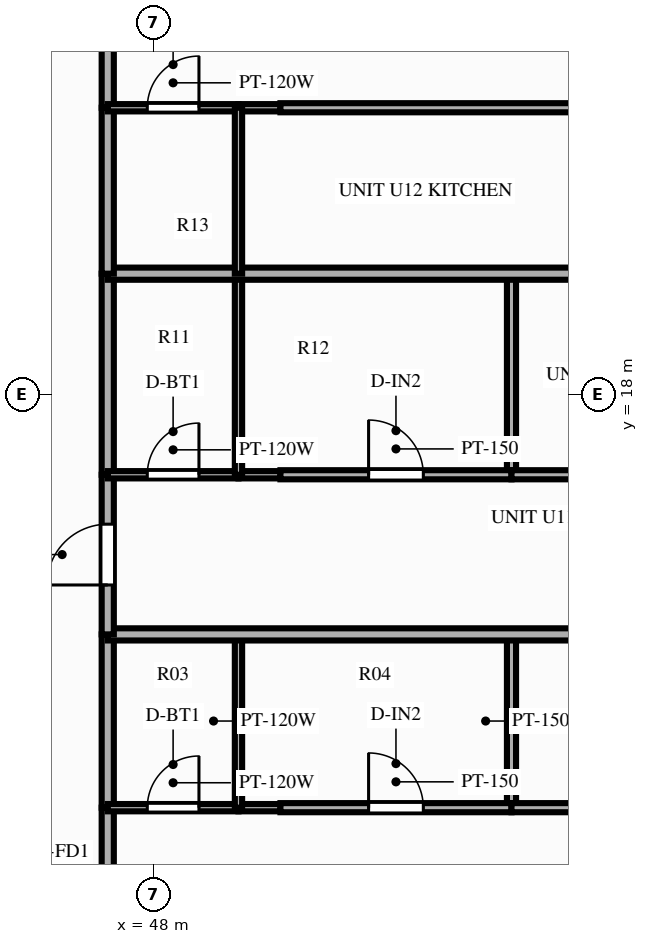
"""IFC4 building model, lengths in metres.
Left out: names, types, materials, properties, quantities, classifications, styles, units other than length and angle.
Written with IfcOpenShell. Run it as: python <this file> out.ifc"""

import sys

from ifc_helpers import new_model, si_unit, direction, frame, frame_2d, origin, place, context, subcontext, project, spatial, rectangle, extrude, source, transform, mapped, element, fill, save


model = new_model("IFC4")
c1 = context("Model", 3, precision=1e-05, world=origin(), true_north=direction((0.0, 1.0)))
c2 = subcontext(c1, "Body", "Model", "MODEL_VIEW")
j1 = project(units=[si_unit("LENGTHUNIT", "METRE"), si_unit("PLANEANGLEUNIT", "RADIAN")], contexts=[c1])
p1 = place(None, origin())
s1 = spatial("IfcSite", under=j1, at=p1, CompositionType="ELEMENT")
p2 = place(p1, origin())
s2 = spatial("IfcBuilding", under=s1, at=p2, CompositionType="ELEMENT")
p3 = place(p2, frame((0.0, 0.0, 113.85)))
s3 = spatial("IfcBuildingStorey", under=s2, at=p3, CompositionType="ELEMENT", Elevation=113.85)
p4 = place(p3, frame((47.25, 7.38, 0.0), z_axis=(0.0, 0.0, 1.0), x_axis=(0.0, 1.0, 0.0)))
e1 = element("IfcWall", 1, at=p4, inside=s3, PredefinedType="PARTITIONING", context=c2, shape_type="SweptSolid", body=[
    extrude(rectangle(XDim=3.824, YDim=0.2, at=frame_2d((1.912, 0.0))), origin(), (0.0, 0.0, 1.0), 2.79),
])
p5 = place(p4, frame((1.412, 0.0, 0.0)))
e2 = element("IfcOpeningElement", 2, at=p5, cuts=e1, PredefinedType="OPENING", context=c2, shape_type="SweptSolid", body=[
    extrude(rectangle(XDim=1.0, YDim=2.15, at=frame_2d((0.5, 1.075))), frame((0.0, 0.112, 0.0), z_axis=(0.0, -1.0, 0.0), x_axis=(1.0, 0.0, 0.0)), (0.0, 0.0, 1.0), 0.224),
])
p6 = place(p3, frame((47.25, 11.204, 0.0), z_axis=(0.0, 0.0, 1.0), x_axis=(0.0, 1.0, 0.0)))
e3 = element("IfcWall", 3, at=p6, inside=s3, PredefinedType="PARTITIONING", context=c2, shape_type="SweptSolid", body=[
    extrude(rectangle(XDim=2.85, YDim=0.2, at=frame_2d((1.425, 0.0))), origin(), (0.0, 0.0, 1.0), 2.79),
])
p7 = place(p3, frame((47.25, 11.204, 0.0), z_axis=(0.0, 0.0, 1.0), x_axis=(1.0, 0.0, 0.0)))
e4 = element("IfcWall", 4, at=p7, inside=s3, PredefinedType="PARTITIONING", context=c2, shape_type="SweptSolid", body=[
    extrude(rectangle(XDim=2.15, YDim=0.12, at=frame_2d((1.075, 0.0))), origin(), (0.0, 0.0, 1.0), 2.79),
])
p8 = place(p7, frame((0.65, 0.0, 0.0)))
e5 = element("IfcOpeningElement", 5, at=p8, cuts=e4, PredefinedType="OPENING", context=c2, shape_type="SweptSolid", body=[
    extrude(rectangle(XDim=0.85, YDim=2.05, at=frame_2d((0.425, 1.025))), frame((0.0, 0.072, 0.0), z_axis=(0.0, -1.0, 0.0), x_axis=(1.0, 0.0, 0.0)), (0.0, 0.0, 1.0), 0.144),
])
p9 = place(p3, frame((49.4, 11.204, 0.0), z_axis=(0.0, 0.0, 1.0), x_axis=(1.0, 0.0, 0.0)))
e6 = element("IfcWall", 6, at=p9, inside=s3, PredefinedType="PARTITIONING", context=c2, shape_type="SweptSolid", body=[
    extrude(rectangle(XDim=0.69, YDim=0.12, at=frame_2d((0.345, 0.0))), origin(), (0.0, 0.0, 1.0), 2.79),
])
p10 = place(p3, frame((49.4, 11.204, 0.0), z_axis=(0.0, 0.0, 1.0), x_axis=(0.0, 1.0, 0.0)))
e7 = element("IfcWall", 7, at=p10, inside=s3, PredefinedType="PARTITIONING", context=c2, shape_type="SweptSolid", body=[
    extrude(rectangle(XDim=2.85, YDim=0.12, at=frame_2d((1.425, 0.0))), origin(), (0.0, 0.0, 1.0), 2.79),
])
p11 = place(p3, frame((53.89, 11.204, 0.0), z_axis=(0.0, 0.0, 1.0), x_axis=(0.0, 1.0, 0.0)))
e8 = element("IfcWall", 8, at=p11, inside=s3, PredefinedType="PARTITIONING", context=c2, shape_type="SweptSolid", body=[
    extrude(rectangle(XDim=2.85, YDim=0.15, at=frame_2d((1.425, 0.0))), origin(), (0.0, 0.0, 1.0), 2.79),
])
p12 = place(p3, frame((50.09, 11.204, 0.0), z_axis=(0.0, 0.0, 1.0), x_axis=(1.0, 0.0, 0.0)))
e9 = element("IfcWall", 9, at=p12, inside=s3, PredefinedType="PARTITIONING", context=c2, shape_type="SweptSolid", body=[
    extrude(rectangle(XDim=3.8, YDim=0.15, at=frame_2d((1.9, 0.0))), origin(), (0.0, 0.0, 1.0), 2.79),
])
p13 = place(p12, frame((1.45, 0.0, 0.0)))
e10 = element("IfcOpeningElement", 10, at=p13, cuts=e9, PredefinedType="OPENING", context=c2, shape_type="SweptSolid", body=[
    extrude(rectangle(XDim=0.9, YDim=2.1, at=frame_2d((0.45, 1.05))), frame((0.0, 0.087, 0.0), z_axis=(0.0, -1.0, 0.0), x_axis=(1.0, 0.0, 0.0)), (0.0, 0.0, 1.0), 0.174),
])
p14 = place(p3, frame((53.89, 11.204, 0.0), z_axis=(0.0, 0.0, 1.0), x_axis=(1.0, 0.0, 0.0)))
e11 = element("IfcWall", 11, at=p14, inside=s3, PredefinedType="PARTITIONING", context=c2, shape_type="SweptSolid", body=[
    extrude(rectangle(XDim=9.96, YDim=0.15, at=frame_2d((4.98, 0.0))), origin(), (0.0, 0.0, 1.0), 2.79),
])
p15 = place(p14, frame((4.53, 0.0, 0.0)))
e12 = element("IfcOpeningElement", 12, at=p15, cuts=e11, PredefinedType="OPENING", context=c2, shape_type="SweptSolid", body=[
    extrude(rectangle(XDim=0.9, YDim=2.1, at=frame_2d((0.45, 1.05))), frame((0.0, 0.087, 0.0), z_axis=(0.0, -1.0, 0.0), x_axis=(1.0, 0.0, 0.0)), (0.0, 0.0, 1.0), 0.174),
])
p16 = place(p3, frame((47.25, 14.054, 0.0), z_axis=(0.0, 0.0, 1.0), x_axis=(1.0, 0.0, 0.0)))
e13 = element("IfcWall", 13, at=p16, inside=s3, PredefinedType="PARTITIONING", context=c2, shape_type="SweptSolid", body=[
    extrude(rectangle(XDim=16.6, YDim=0.2, at=frame_2d((8.3, 0.0))), origin(), (0.0, 0.0, 1.0), 2.79),
])
p17 = place(p3, frame((47.25, 14.054, 0.0), z_axis=(0.0, 0.0, 1.0), x_axis=(0.0, 1.0, 0.0)))
e14 = element("IfcWall", 14, at=p17, inside=s3, PredefinedType="PARTITIONING", context=c2, shape_type="SweptSolid", body=[
    extrude(rectangle(XDim=2.625, YDim=0.2, at=frame_2d((1.313, 0.0))), origin(), (0.0, 0.0, 1.0), 2.79),
])
p18 = place(p17, frame((0.813, 0.0, 0.0)))
e15 = element("IfcOpeningElement", 15, at=p18, cuts=e14, PredefinedType="OPENING", context=c2, shape_type="SweptSolid", body=[
    extrude(rectangle(XDim=1.0, YDim=2.15, at=frame_2d((0.5, 1.075))), frame((0.0, 0.112, 0.0), z_axis=(0.0, -1.0, 0.0), x_axis=(1.0, 0.0, 0.0)), (0.0, 0.0, 1.0), 0.224),
])
p19 = place(p3, frame((47.25, 16.68, 0.0), z_axis=(0.0, 0.0, 1.0), x_axis=(0.0, 1.0, 0.0)))
e16 = element("IfcWall", 16, at=p19, inside=s3, PredefinedType="PARTITIONING", context=c2, shape_type="SweptSolid", body=[
    extrude(rectangle(XDim=3.307, YDim=0.2, at=frame_2d((1.654, 0.0))), origin(), (0.0, 0.0, 1.0), 2.79),
])
p20 = place(p3, frame((47.25, 16.68, 0.0), z_axis=(0.0, 0.0, 1.0), x_axis=(1.0, 0.0, 0.0)))
e17 = element("IfcWall", 17, at=p20, inside=s3, PredefinedType="PARTITIONING", context=c2, shape_type="SweptSolid", body=[
    extrude(rectangle(XDim=2.15, YDim=0.12, at=frame_2d((1.075, 0.0))), origin(), (0.0, 0.0, 1.0), 2.79),
])
p21 = place(p20, frame((0.65, 0.0, 0.0)))
e18 = element("IfcOpeningElement", 18, at=p21, cuts=e17, PredefinedType="OPENING", context=c2, shape_type="SweptSolid", body=[
    extrude(rectangle(XDim=0.85, YDim=2.05, at=frame_2d((0.425, 1.025))), frame((0.0, 0.072, 0.0), z_axis=(0.0, -1.0, 0.0), x_axis=(1.0, 0.0, 0.0)), (0.0, 0.0, 1.0), 0.144),
])
p22 = place(p3, frame((49.4, 16.68, 0.0), z_axis=(0.0, 0.0, 1.0), x_axis=(1.0, 0.0, 0.0)))
e19 = element("IfcWall", 19, at=p22, inside=s3, PredefinedType="PARTITIONING", context=c2, shape_type="SweptSolid", body=[
    extrude(rectangle(XDim=0.69, YDim=0.12, at=frame_2d((0.345, 0.0))), origin(), (0.0, 0.0, 1.0), 2.79),
])
p23 = place(p3, frame((49.4, 16.68, 0.0), z_axis=(0.0, 0.0, 1.0), x_axis=(0.0, 1.0, 0.0)))
e20 = element("IfcWall", 20, at=p23, inside=s3, PredefinedType="PARTITIONING", context=c2, shape_type="SweptSolid", body=[
    extrude(rectangle(XDim=3.307, YDim=0.12, at=frame_2d((1.654, 0.0))), origin(), (0.0, 0.0, 1.0), 2.79),
])
p24 = place(p3, frame((53.89, 16.68, 0.0), z_axis=(0.0, 0.0, 1.0), x_axis=(0.0, 1.0, 0.0)))
e21 = element("IfcWall", 21, at=p24, inside=s3, PredefinedType="PARTITIONING", context=c2, shape_type="SweptSolid", body=[
    extrude(rectangle(XDim=3.307, YDim=0.15, at=frame_2d((1.654, 0.0))), origin(), (0.0, 0.0, 1.0), 2.79),
])
p25 = place(p3, frame((50.09, 16.68, 0.0), z_axis=(0.0, 0.0, 1.0), x_axis=(1.0, 0.0, 0.0)))
e22 = element("IfcWall", 22, at=p25, inside=s3, PredefinedType="PARTITIONING", context=c2, shape_type="SweptSolid", body=[
    extrude(rectangle(XDim=3.8, YDim=0.15, at=frame_2d((1.9, 0.0))), origin(), (0.0, 0.0, 1.0), 2.79),
])
p26 = place(p25, frame((1.45, 0.0, 0.0)))
e23 = element("IfcOpeningElement", 23, at=p26, cuts=e22, PredefinedType="OPENING", context=c2, shape_type="SweptSolid", body=[
    extrude(rectangle(XDim=0.9, YDim=2.1, at=frame_2d((0.45, 1.05))), frame((0.0, 0.087, 0.0), z_axis=(0.0, -1.0, 0.0), x_axis=(1.0, 0.0, 0.0)), (0.0, 0.0, 1.0), 0.174),
])
p27 = place(p3, frame((53.89, 16.68, 0.0), z_axis=(0.0, 0.0, 1.0), x_axis=(1.0, 0.0, 0.0)))
e24 = element("IfcWall", 24, at=p27, inside=s3, PredefinedType="PARTITIONING", context=c2, shape_type="SweptSolid", body=[
    extrude(rectangle(XDim=9.96, YDim=0.15, at=frame_2d((4.98, 0.0))), origin(), (0.0, 0.0, 1.0), 2.79),
])
p28 = place(p27, frame((4.53, 0.0, 0.0)))
e25 = element("IfcOpeningElement", 25, at=p28, cuts=e24, PredefinedType="OPENING", context=c2, shape_type="SweptSolid", body=[
    extrude(rectangle(XDim=0.9, YDim=2.1, at=frame_2d((0.45, 1.05))), frame((0.0, 0.087, 0.0), z_axis=(0.0, -1.0, 0.0), x_axis=(1.0, 0.0, 0.0)), (0.0, 0.0, 1.0), 0.174),
])
p29 = place(p3, frame((47.25, 19.987, 0.0), z_axis=(0.0, 0.0, 1.0), x_axis=(1.0, 0.0, 0.0)))
e26 = element("IfcWall", 26, at=p29, inside=s3, PredefinedType="PARTITIONING", context=c2, shape_type="SweptSolid", body=[
    extrude(rectangle(XDim=16.6, YDim=0.2, at=frame_2d((8.3, 0.0))), origin(), (0.0, 0.0, 1.0), 2.79),
])
p30 = place(p3, frame((47.25, 19.987, 0.0), z_axis=(0.0, 0.0, 1.0), x_axis=(0.0, 1.0, 0.0)))
e27 = element("IfcWall", 27, at=p30, inside=s3, PredefinedType="PARTITIONING", context=c2, shape_type="SweptSolid", body=[
    extrude(rectangle(XDim=2.729, YDim=0.2, at=frame_2d((1.365, 0.0))), origin(), (0.0, 0.0, 1.0), 2.79),
])
p31 = place(p3, frame((47.25, 22.716, 0.0), z_axis=(0.0, 0.0, 1.0), x_axis=(0.0, 1.0, 0.0)))
e28 = element("IfcWall", 28, at=p31, inside=s3, PredefinedType="PARTITIONING", context=c2, shape_type="SweptSolid", body=[
    extrude(rectangle(XDim=3.204, YDim=0.2, at=frame_2d((1.602, 0.0))), origin(), (0.0, 0.0, 1.0), 2.79),
])
p32 = place(p31, frame((1.102, 0.0, 0.0)))
e29 = element("IfcOpeningElement", 29, at=p32, cuts=e28, PredefinedType="OPENING", context=c2, shape_type="SweptSolid", body=[
    extrude(rectangle(XDim=1.0, YDim=2.15, at=frame_2d((0.5, 1.075))), frame((0.0, 0.112, 0.0), z_axis=(0.0, -1.0, 0.0), x_axis=(1.0, 0.0, 0.0)), (0.0, 0.0, 1.0), 0.224),
])
p33 = place(p3, frame((47.25, 22.716, 0.0), z_axis=(0.0, 0.0, 1.0), x_axis=(1.0, 0.0, 0.0)))
e30 = element("IfcWall", 30, at=p33, inside=s3, PredefinedType="PARTITIONING", context=c2, shape_type="SweptSolid", body=[
    extrude(rectangle(XDim=2.15, YDim=0.12, at=frame_2d((1.075, 0.0))), origin(), (0.0, 0.0, 1.0), 2.79),
])
p34 = place(p33, frame((0.65, 0.0, 0.0)))
e31 = element("IfcOpeningElement", 31, at=p34, cuts=e30, PredefinedType="OPENING", context=c2, shape_type="SweptSolid", body=[
    extrude(rectangle(XDim=0.85, YDim=2.05, at=frame_2d((0.425, 1.025))), frame((0.0, 0.072, 0.0), z_axis=(0.0, -1.0, 0.0), x_axis=(1.0, 0.0, 0.0)), (0.0, 0.0, 1.0), 0.144),
])
p35 = place(p3, frame((49.4, 22.716, 0.0), z_axis=(0.0, 0.0, 1.0), x_axis=(1.0, 0.0, 0.0)))
e32 = element("IfcWall", 32, at=p35, inside=s3, PredefinedType="PARTITIONING", context=c2, shape_type="SweptSolid", body=[
    extrude(rectangle(XDim=0.69, YDim=0.12, at=frame_2d((0.345, 0.0))), origin(), (0.0, 0.0, 1.0), 2.79),
])
p36 = place(p3, frame((49.4, 19.987, 0.0), z_axis=(0.0, 0.0, 1.0), x_axis=(0.0, 1.0, 0.0)))
e33 = element("IfcWall", 33, at=p36, inside=s3, PredefinedType="PARTITIONING", context=c2, shape_type="SweptSolid", body=[
    extrude(rectangle(XDim=2.729, YDim=0.12, at=frame_2d((1.365, 0.0))), origin(), (0.0, 0.0, 1.0), 2.79),
])
p37 = place(p3, frame((50.09, 22.716, 0.0), z_axis=(0.0, 0.0, 1.0), x_axis=(1.0, 0.0, 0.0)))
e34 = element("IfcWall", 34, at=p37, inside=s3, PredefinedType="PARTITIONING", context=c2, shape_type="SweptSolid", body=[
    extrude(rectangle(XDim=13.76, YDim=0.15, at=frame_2d((6.88, 0.0))), origin(), (0.0, 0.0, 1.0), 2.79),
])
p38 = place(p37, frame((5.914, 0.0, 0.0)))
e35 = element("IfcOpeningElement", 35, at=p38, cuts=e34, PredefinedType="OPENING", context=c2, shape_type="SweptSolid", body=[
    extrude(rectangle(XDim=0.9, YDim=2.1, at=frame_2d((0.45, 1.05))), frame((0.0, 0.087, 0.0), z_axis=(0.0, -1.0, 0.0), x_axis=(1.0, 0.0, 0.0)), (0.0, 0.0, 1.0), 0.174),
])
m1 = source(origin(), c2, "Body", "SweptSolid", [
    extrude(rectangle(XDim=0.85, YDim=2.05, at=frame_2d((0.425, 1.025))), frame((0.0, 0.025, 0.0), z_axis=(0.0, -1.0, 0.0), x_axis=(1.0, 0.0, 0.0)), (0.0, 0.0, 1.0), 0.05),
])
p39 = place(p8, origin())
e36 = element("IfcDoor", 36, at=p39, inside=s3, OperationType="SINGLE_SWING_RIGHT", PredefinedType="DOOR", context=c2, shape_type="MappedRepresentation", body=[
    mapped(m1, transform((0.0, 0.0, 0.0), scale=1.0)),
])
fill(e5, e36)
m2 = source(origin(), c2, "Body", "SweptSolid", [
    extrude(rectangle(XDim=0.9, YDim=2.1, at=frame_2d((0.45, 1.05))), frame((0.0, 0.025, 0.0), z_axis=(0.0, -1.0, 0.0), x_axis=(1.0, 0.0, 0.0)), (0.0, 0.0, 1.0), 0.05),
])
p40 = place(p13, origin())
e37 = element("IfcDoor", 37, at=p40, inside=s3, OperationType="SINGLE_SWING_LEFT", PredefinedType="DOOR", context=c2, shape_type="MappedRepresentation", body=[
    mapped(m2, transform((0.0, 0.0, 0.0), scale=1.0)),
])
fill(e10, e37)
m3 = source(origin(), c2, "Body", "SweptSolid", [
    extrude(rectangle(XDim=1.0, YDim=2.15, at=frame_2d((0.5, 1.075))), frame((0.0, 0.025, 0.0), z_axis=(0.0, -1.0, 0.0), x_axis=(1.0, 0.0, 0.0)), (0.0, 0.0, 1.0), 0.05),
])
p41 = place(p18, origin())
e38 = element("IfcDoor", 38, at=p41, inside=s3, OperationType="SINGLE_SWING_LEFT", PredefinedType="DOOR", context=c2, shape_type="MappedRepresentation", body=[
    mapped(m3, transform((0.0, 0.0, 0.0), scale=1.0)),
])
fill(e15, e38)
p42 = place(p21, origin())
e39 = element("IfcDoor", 39, at=p42, inside=s3, OperationType="SINGLE_SWING_RIGHT", PredefinedType="DOOR", context=c2, shape_type="MappedRepresentation", body=[
    mapped(m1, transform((0.0, 0.0, 0.0), scale=1.0)),
])
fill(e18, e39)
p43 = place(p26, origin())
e40 = element("IfcDoor", 40, at=p43, inside=s3, OperationType="SINGLE_SWING_LEFT", PredefinedType="DOOR", context=c2, shape_type="MappedRepresentation", body=[
    mapped(m2, transform((0.0, 0.0, 0.0), scale=1.0)),
])
fill(e23, e40)
p44 = place(p34, origin())
e41 = element("IfcDoor", 41, at=p44, inside=s3, OperationType="SINGLE_SWING_RIGHT", PredefinedType="DOOR", context=c2, shape_type="MappedRepresentation", body=[
    mapped(m1, transform((0.0, 0.0, 0.0), scale=1.0)),
])
fill(e31, e41)
save(model, sys.argv[1])
